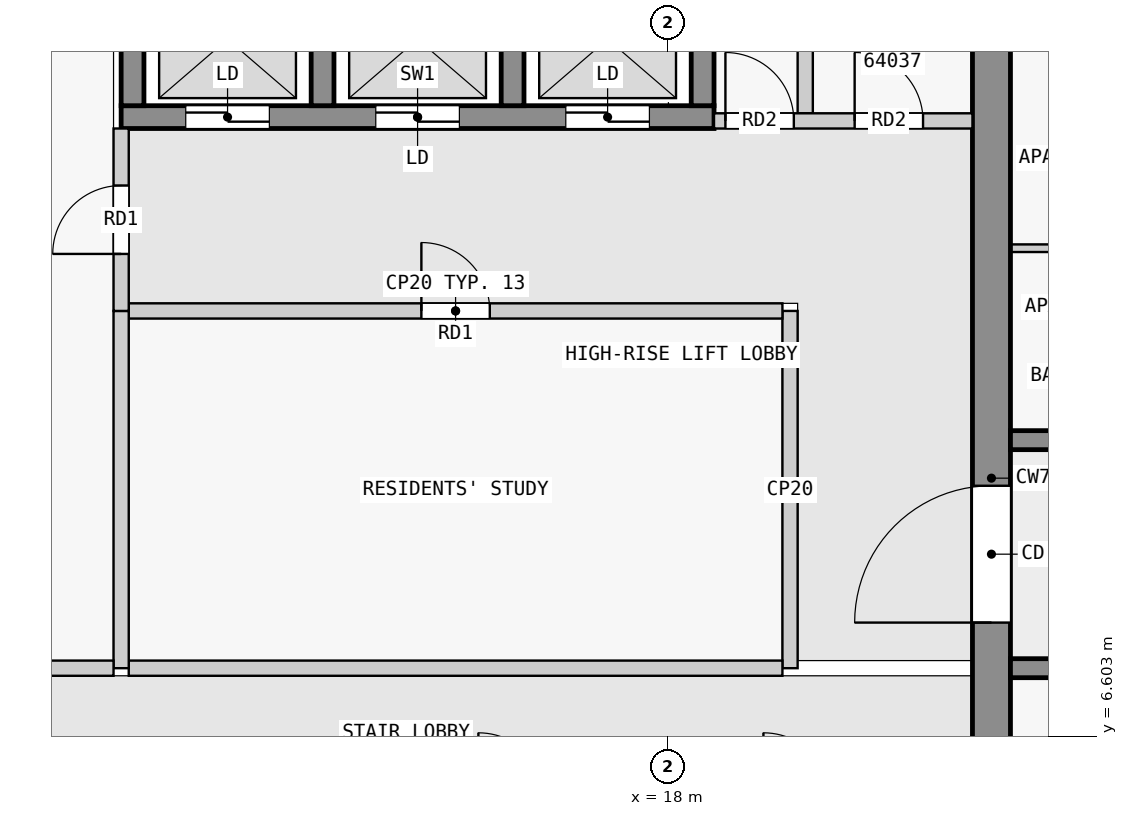
"""IFC4 building model, lengths in metres.
Left out: names, types, materials, properties, quantities, classifications, styles, units other than length and angle.
Written with IfcOpenShell. Run it as: python <this file> out.ifc"""

import sys

from ifc_helpers import new_model, si_unit, direction, frame, frame_2d, origin, place, context, subcontext, project, spatial, rectangle, extrude, element, fill, save


model = new_model("IFC4")
c1 = context("Model", 3, precision=1e-05, world=origin(), true_north=direction((0.0, 1.0)))
c2 = subcontext(c1, "Body", "Model", "MODEL_VIEW")
j1 = project(units=[si_unit("LENGTHUNIT", "METRE"), si_unit("PLANEANGLEUNIT", "RADIAN")], contexts=[c1])
p1 = place(None, origin())
s1 = spatial("IfcSite", under=j1, at=p1, CompositionType="ELEMENT")
p2 = place(p1, origin())
s2 = spatial("IfcBuilding", under=s1, at=p2, CompositionType="ELEMENT")
p3 = place(p2, frame((0.0, 0.0, 245.9)))
s3 = spatial("IfcBuildingStorey", under=s2, at=p3, CompositionType="ELEMENT", Elevation=245.9)
p4 = place(p3, frame((22.25, 2.5, 0.0), z_axis=(0.0, 0.0, 1.0), x_axis=(0.0, 1.0, 0.0)))
e1 = element("IfcWall", 1, at=p4, inside=s3, PredefinedType="SHEAR", context=c2, shape_type="SweptSolid", body=[
    extrude(rectangle(XDim=15.0, YDim=0.5, at=frame_2d((7.5, 0.0))), origin(), (0.0, 0.0, 1.0), 3.25),
])
p5 = place(p4, frame((5.6, 0.0, 0.0)))
e2 = element("IfcOpeningElement", 2, at=p5, cuts=e1, PredefinedType="OPENING", context=c2, shape_type="SweptSolid", body=[
    extrude(rectangle(XDim=1.8, YDim=2.1, at=frame_2d((0.9, 1.05))), frame((0.0, 0.26, 0.0), z_axis=(0.0, -1.0, 0.0), x_axis=(1.0, 0.0, 0.0)), (0.0, 0.0, 1.0), 0.52),
])
p6 = place(p3, frame((10.8, 14.75, 0.0), z_axis=(0.0, 0.0, 1.0), x_axis=(1.0, 0.0, 0.0)))
e3 = element("IfcWall", 3, at=p6, inside=s3, PredefinedType="SHEAR", context=c2, shape_type="SweptSolid", body=[
    extrude(rectangle(XDim=7.8, YDim=0.3, at=frame_2d((3.9, 0.0))), origin(), (0.0, 0.0, 1.0), 3.25),
])
p7 = place(p6, frame((0.85, 0.0, 0.0)))
e4 = element("IfcOpeningElement", 4, at=p7, cuts=e3, PredefinedType="OPENING", context=c2, shape_type="SweptSolid", body=[
    extrude(rectangle(XDim=1.1, YDim=2.1, at=frame_2d((0.55, 1.05))), frame((0.0, 0.16, 0.0), z_axis=(0.0, -1.0, 0.0), x_axis=(1.0, 0.0, 0.0)), (0.0, 0.0, 1.0), 0.32),
])
p8 = place(p6, frame((3.35, 0.0, 0.0)))
e5 = element("IfcOpeningElement", 5, at=p8, cuts=e3, PredefinedType="OPENING", context=c2, shape_type="SweptSolid", body=[
    extrude(rectangle(XDim=1.1, YDim=2.1, at=frame_2d((0.55, 1.05))), frame((0.0, 0.16, 0.0), z_axis=(0.0, -1.0, 0.0), x_axis=(1.0, 0.0, 0.0)), (0.0, 0.0, 1.0), 0.32),
])
p9 = place(p6, frame((5.85, 0.0, 0.0)))
e6 = element("IfcOpeningElement", 6, at=p9, cuts=e3, PredefinedType="OPENING", context=c2, shape_type="SweptSolid", body=[
    extrude(rectangle(XDim=1.1, YDim=2.1, at=frame_2d((0.55, 1.05))), frame((0.0, 0.16, 0.0), z_axis=(0.0, -1.0, 0.0), x_axis=(1.0, 0.0, 0.0)), (0.0, 0.0, 1.0), 0.32),
])
for number, where, z_axis, x_axis in (
    (7, (10.95, 14.9, 0.0), (0.0, 0.0, 1.0), (0.0, 1.0, 0.0)),
    (8, (13.45, 14.9, 0.0), (0.0, 0.0, 1.0), (0.0, 1.0, 0.0)),
    (9, (15.95, 14.9, 0.0), (0.0, 0.0, 1.0), (0.0, 1.0, 0.0)),
    (10, (18.45, 14.9, 0.0), (0.0, 0.0, 1.0), (0.0, 1.0, 0.0)),
):
    element("IfcWall", number, at=place(p3, frame(where, z_axis=z_axis, x_axis=x_axis)), inside=s3, PredefinedType="SHEAR", context=c2, shape_type="SweptSolid", body=[
        extrude(rectangle(XDim=2.0, YDim=0.3, at=frame_2d((1.0, 0.0))), origin(), (0.0, 0.0, 1.0), 3.25),
    ])
p10 = place(p3, frame((22.5, 7.5, 0.0), z_axis=(0.0, 0.0, 1.0), x_axis=(1.0, 0.0, 0.0)))
e11 = element("IfcWall", 11, at=p10, inside=s3, PredefinedType="SHEAR", context=c2, shape_type="SweptSolid", body=[
    extrude(rectangle(XDim=22.5, YDim=0.25, at=frame_2d((11.25, 0.0))), origin(), (0.0, 0.0, 1.0), 3.25),
])
p11 = place(p10, frame((1.75, 0.0, 0.0)))
e12 = element("IfcOpeningElement", 12, at=p11, cuts=e11, PredefinedType="OPENING", context=c2, shape_type="SweptSolid", body=[
    extrude(rectangle(XDim=1.0, YDim=2.1, at=frame_2d((0.5, 1.05))), frame((0.0, 0.135, 0.0), z_axis=(0.0, -1.0, 0.0), x_axis=(1.0, 0.0, 0.0)), (0.0, 0.0, 1.0), 0.27),
])
p12 = place(p10, frame((5.85, 0.0, 0.0)))
e13 = element("IfcOpeningElement", 13, at=p12, cuts=e11, PredefinedType="OPENING", context=c2, shape_type="SweptSolid", body=[
    extrude(rectangle(XDim=1.8, YDim=2.1, at=frame_2d((0.9, 1.05))), frame((0.0, 0.135, 0.0), z_axis=(0.0, -1.0, 0.0), x_axis=(1.0, 0.0, 0.0)), (0.0, 0.0, 1.0), 0.27),
])
p13 = place(p10, frame((13.05, 0.0, 0.0)))
e14 = element("IfcOpeningElement", 14, at=p13, cuts=e11, PredefinedType="OPENING", context=c2, shape_type="SweptSolid", body=[
    extrude(rectangle(XDim=1.0, YDim=2.1, at=frame_2d((0.5, 1.05))), frame((0.0, 0.135, 0.0), z_axis=(0.0, -1.0, 0.0), x_axis=(1.0, 0.0, 0.0)), (0.0, 0.0, 1.0), 0.27),
])
p14 = place(p10, frame((18.75, 0.0, 0.0)))
e15 = element("IfcOpeningElement", 15, at=p14, cuts=e11, PredefinedType="OPENING", context=c2, shape_type="SweptSolid", body=[
    extrude(rectangle(XDim=0.9, YDim=2.1, at=frame_2d((0.45, 1.05))), frame((0.0, 0.135, 0.0), z_axis=(0.0, -1.0, 0.0), x_axis=(1.0, 0.0, 0.0)), (0.0, 0.0, 1.0), 0.27),
])
p15 = place(p10, frame((20.95, 0.0, 0.0)))
e16 = element("IfcOpeningElement", 16, at=p15, cuts=e11, PredefinedType="OPENING", context=c2, shape_type="SweptSolid", body=[
    extrude(rectangle(XDim=1.0, YDim=2.1, at=frame_2d((0.5, 1.05))), frame((0.0, 0.135, 0.0), z_axis=(0.0, -1.0, 0.0), x_axis=(1.0, 0.0, 0.0)), (0.0, 0.0, 1.0), 0.27),
])
p16 = place(p3, frame((22.5, 10.5, 0.0), z_axis=(0.0, 0.0, 1.0), x_axis=(1.0, 0.0, 0.0)))
e17 = element("IfcWall", 17, at=p16, inside=s3, PredefinedType="SHEAR", context=c2, shape_type="SweptSolid", body=[
    extrude(rectangle(XDim=22.5, YDim=0.25, at=frame_2d((11.25, 0.0))), origin(), (0.0, 0.0, 1.0), 3.25),
])
p17 = place(p16, frame((4.05, 0.0, 0.0)))
e18 = element("IfcOpeningElement", 18, at=p17, cuts=e17, PredefinedType="OPENING", context=c2, shape_type="SweptSolid", body=[
    extrude(rectangle(XDim=1.0, YDim=2.1, at=frame_2d((0.5, 1.05))), frame((0.0, 0.135, 0.0), z_axis=(0.0, -1.0, 0.0), x_axis=(1.0, 0.0, 0.0)), (0.0, 0.0, 1.0), 0.27),
])
p18 = place(p16, frame((10.75, 0.0, 0.0)))
e19 = element("IfcOpeningElement", 19, at=p18, cuts=e17, PredefinedType="OPENING", context=c2, shape_type="SweptSolid", body=[
    extrude(rectangle(XDim=1.0, YDim=2.1, at=frame_2d((0.5, 1.05))), frame((0.0, 0.135, 0.0), z_axis=(0.0, -1.0, 0.0), x_axis=(1.0, 0.0, 0.0)), (0.0, 0.0, 1.0), 0.27),
])
p19 = place(p16, frame((16.85, 0.0, 0.0)))
e20 = element("IfcOpeningElement", 20, at=p19, cuts=e17, PredefinedType="OPENING", context=c2, shape_type="SweptSolid", body=[
    extrude(rectangle(XDim=1.0, YDim=2.1, at=frame_2d((0.5, 1.05))), frame((0.0, 0.135, 0.0), z_axis=(0.0, -1.0, 0.0), x_axis=(1.0, 0.0, 0.0)), (0.0, 0.0, 1.0), 0.27),
])
p20 = place(p3, frame((7.1, 7.5, 0.0), z_axis=(0.0, 0.0, 1.0), x_axis=(1.0, 0.0, 0.0)))
e21 = element("IfcWall", 21, at=p20, inside=s3, PredefinedType="PARTITIONING", context=c2, shape_type="SweptSolid", body=[
    extrude(rectangle(XDim=3.6, YDim=0.2, at=frame_2d((1.8, 0.0))), origin(), (0.0, 0.0, 1.0), 3.25),
])
p21 = place(p3, frame((10.8, 12.2, 0.0), z_axis=(0.0, 0.0, 1.0), x_axis=(0.0, 1.0, 0.0)))
e22 = element("IfcWall", 22, at=p21, inside=s3, PredefinedType="PARTITIONING", context=c2, shape_type="SweptSolid", body=[
    extrude(rectangle(XDim=2.4, YDim=0.2, at=frame_2d((1.2, 0.0))), origin(), (0.0, 0.0, 1.0), 3.25),
])
p22 = place(p21, frame((0.75, 0.0, 0.0)))
e23 = element("IfcOpeningElement", 23, at=p22, cuts=e22, PredefinedType="OPENING", context=c2, shape_type="SweptSolid", body=[
    extrude(rectangle(XDim=0.9, YDim=2.1, at=frame_2d((0.45, 1.05))), frame((0.0, 0.11, 0.0), z_axis=(0.0, -1.0, 0.0), x_axis=(1.0, 0.0, 0.0)), (0.0, 0.0, 1.0), 0.22),
])
p23 = place(p3, frame((10.8, 7.5, 0.0), z_axis=(0.0, 0.0, 1.0), x_axis=(0.0, 1.0, 0.0)))
e24 = element("IfcWall", 24, at=p23, inside=s3, PredefinedType="PARTITIONING", context=c2, shape_type="SweptSolid", body=[
    extrude(rectangle(XDim=4.7, YDim=0.2, at=frame_2d((2.35, 0.0))), origin(), (0.0, 0.0, 1.0), 3.25),
])
p24 = place(p3, frame((10.9, 7.5, 0.0), z_axis=(0.0, 0.0, 1.0), x_axis=(1.0, 0.0, 0.0)))
e25 = element("IfcWall", 25, at=p24, inside=s3, PredefinedType="PARTITIONING", context=c2, shape_type="SweptSolid", body=[
    extrude(rectangle(XDim=8.6, YDim=0.2, at=frame_2d((4.3, 0.0))), origin(), (0.0, 0.0, 1.0), 3.25),
])
p25 = place(p3, frame((19.6, 7.5, 0.0), z_axis=(0.0, 0.0, 1.0), x_axis=(0.0, 1.0, 0.0)))
e26 = element("IfcWall", 26, at=p25, inside=s3, PredefinedType="PARTITIONING", context=c2, shape_type="SweptSolid", body=[
    extrude(rectangle(XDim=4.7, YDim=0.2, at=frame_2d((2.35, 0.0))), origin(), (0.0, 0.0, 1.0), 3.25),
])
p26 = place(p3, frame((10.9, 12.2, 0.0), z_axis=(0.0, 0.0, 1.0), x_axis=(1.0, 0.0, 0.0)))
e27 = element("IfcWall", 27, at=p26, inside=s3, PredefinedType="PARTITIONING", context=c2, shape_type="SweptSolid", body=[
    extrude(rectangle(XDim=8.6, YDim=0.2, at=frame_2d((4.3, 0.0))), origin(), (0.0, 0.0, 1.0), 3.25),
])
p27 = place(p26, frame((3.85, 0.0, 0.0)))
e28 = element("IfcOpeningElement", 28, at=p27, cuts=e27, PredefinedType="OPENING", context=c2, shape_type="SweptSolid", body=[
    extrude(rectangle(XDim=0.9, YDim=2.1, at=frame_2d((0.45, 1.05))), frame((0.0, 0.11, 0.0), z_axis=(0.0, -1.0, 0.0), x_axis=(1.0, 0.0, 0.0)), (0.0, 0.0, 1.0), 0.22),
])
p28 = place(p3, frame((18.6, 14.7, 0.0), z_axis=(0.0, 0.0, 1.0), x_axis=(1.0, 0.0, 0.0)))
e29 = element("IfcWall", 29, at=p28, inside=s3, PredefinedType="PARTITIONING", context=c2, shape_type="SweptSolid", body=[
    extrude(rectangle(XDim=3.4, YDim=0.2, at=frame_2d((1.7, 0.0))), origin(), (0.0, 0.0, 1.0), 3.25),
])
p29 = place(p28, frame((0.15, 0.0, 0.0)))
e30 = element("IfcOpeningElement", 30, at=p29, cuts=e29, PredefinedType="OPENING", context=c2, shape_type="SweptSolid", body=[
    extrude(rectangle(XDim=0.9, YDim=2.1, at=frame_2d((0.45, 1.05))), frame((0.0, 0.11, 0.0), z_axis=(0.0, -1.0, 0.0), x_axis=(1.0, 0.0, 0.0)), (0.0, 0.0, 1.0), 0.22),
])
p30 = place(p28, frame((1.85, 0.0, 0.0)))
e31 = element("IfcOpeningElement", 31, at=p30, cuts=e29, PredefinedType="OPENING", context=c2, shape_type="SweptSolid", body=[
    extrude(rectangle(XDim=0.9, YDim=2.1, at=frame_2d((0.45, 1.05))), frame((0.0, 0.11, 0.0), z_axis=(0.0, -1.0, 0.0), x_axis=(1.0, 0.0, 0.0)), (0.0, 0.0, 1.0), 0.22),
])
p31 = place(p3, frame((19.8, 14.8, 0.0), z_axis=(0.0, 0.0, 1.0), x_axis=(0.0, 1.0, 0.0)))
e32 = element("IfcWall", 32, at=p31, inside=s3, PredefinedType="PARTITIONING", context=c2, shape_type="SweptSolid", body=[
    extrude(rectangle(XDim=2.7, YDim=0.2, at=frame_2d((1.35, 0.0))), origin(), (0.0, 0.0, 1.0), 3.25),
])
p32 = place(p3, frame((24.25, 13.025, 0.0), z_axis=(0.0, 0.0, 1.0), x_axis=(-1.0, 0.0, 0.0)))
e33 = element("IfcWall", 33, at=p32, inside=s3, PredefinedType="PARTITIONING", context=c2, shape_type="SweptSolid", body=[
    extrude(rectangle(XDim=1.75, YDim=0.1, at=frame_2d((0.875, 0.0))), origin(), (0.0, 0.0, 1.0), 3.25),
])
p33 = place(p22, origin())
e34 = element("IfcDoor", 34, at=p33, inside=s3, OperationType="SINGLE_SWING_LEFT", PredefinedType="DOOR", context=c2, shape_type="SweptSolid", body=[
    extrude(rectangle(XDim=0.9, YDim=2.1, at=frame_2d((0.45, 1.05))), frame((0.0, 0.025, 0.0), z_axis=(0.0, -1.0, 0.0), x_axis=(1.0, 0.0, 0.0)), (0.0, 0.0, 1.0), 0.05),
])
fill(e23, e34)
p34 = place(p27, origin())
e35 = element("IfcDoor", 35, at=p34, inside=s3, OperationType="SINGLE_SWING_LEFT", PredefinedType="DOOR", context=c2, shape_type="SweptSolid", body=[
    extrude(rectangle(XDim=0.9, YDim=2.1, at=frame_2d((0.45, 1.05))), frame((0.0, 0.025, 0.0), z_axis=(0.0, -1.0, 0.0), x_axis=(1.0, 0.0, 0.0)), (0.0, 0.0, 1.0), 0.05),
])
fill(e28, e35)
p35 = place(p7, origin())
e36 = element("IfcDoor", 36, at=p35, inside=s3, OperationType="DOUBLE_DOOR_SLIDING", PredefinedType="DOOR", context=c2, shape_type="SweptSolid", body=[
    extrude(rectangle(XDim=1.1, YDim=2.1, at=frame_2d((0.55, 1.05))), frame((0.0, 0.025, 0.0), z_axis=(0.0, -1.0, 0.0), x_axis=(1.0, 0.0, 0.0)), (0.0, 0.0, 1.0), 0.05),
])
fill(e4, e36)
p36 = place(p8, origin())
e37 = element("IfcDoor", 37, at=p36, inside=s3, OperationType="DOUBLE_DOOR_SLIDING", PredefinedType="DOOR", context=c2, shape_type="SweptSolid", body=[
    extrude(rectangle(XDim=1.1, YDim=2.1, at=frame_2d((0.55, 1.05))), frame((0.0, 0.025, 0.0), z_axis=(0.0, -1.0, 0.0), x_axis=(1.0, 0.0, 0.0)), (0.0, 0.0, 1.0), 0.05),
])
fill(e5, e37)
p37 = place(p9, origin())
e38 = element("IfcDoor", 38, at=p37, inside=s3, OperationType="DOUBLE_DOOR_SLIDING", PredefinedType="DOOR", context=c2, shape_type="SweptSolid", body=[
    extrude(rectangle(XDim=1.1, YDim=2.1, at=frame_2d((0.55, 1.05))), frame((0.0, 0.025, 0.0), z_axis=(0.0, -1.0, 0.0), x_axis=(1.0, 0.0, 0.0)), (0.0, 0.0, 1.0), 0.05),
])
fill(e6, e38)
p38 = place(p5, origin())
e39 = element("IfcDoor", 39, at=p38, inside=s3, OperationType="DOUBLE_DOOR_SINGLE_SWING", PredefinedType="DOOR", context=c2, shape_type="SweptSolid", body=[
    extrude(rectangle(XDim=1.8, YDim=2.1, at=frame_2d((0.9, 1.05))), frame((0.0, 0.025, 0.0), z_axis=(0.0, -1.0, 0.0), x_axis=(1.0, 0.0, 0.0)), (0.0, 0.0, 1.0), 0.05),
])
fill(e2, e39)
p39 = place(p29, origin())
e40 = element("IfcDoor", 40, at=p39, inside=s3, OperationType="SINGLE_SWING_LEFT", PredefinedType="DOOR", context=c2, shape_type="SweptSolid", body=[
    extrude(rectangle(XDim=0.9, YDim=2.1, at=frame_2d((0.45, 1.05))), frame((0.0, 0.025, 0.0), z_axis=(0.0, -1.0, 0.0), x_axis=(1.0, 0.0, 0.0)), (0.0, 0.0, 1.0), 0.05),
])
fill(e30, e40)
p40 = place(p30, origin())
e41 = element("IfcDoor", 41, at=p40, inside=s3, OperationType="SINGLE_SWING_LEFT", PredefinedType="DOOR", context=c2, shape_type="SweptSolid", body=[
    extrude(rectangle(XDim=0.9, YDim=2.1, at=frame_2d((0.45, 1.05))), frame((0.0, 0.025, 0.0), z_axis=(0.0, -1.0, 0.0), x_axis=(1.0, 0.0, 0.0)), (0.0, 0.0, 1.0), 0.05),
])
fill(e31, e41)
save(model, sys.argv[1])
